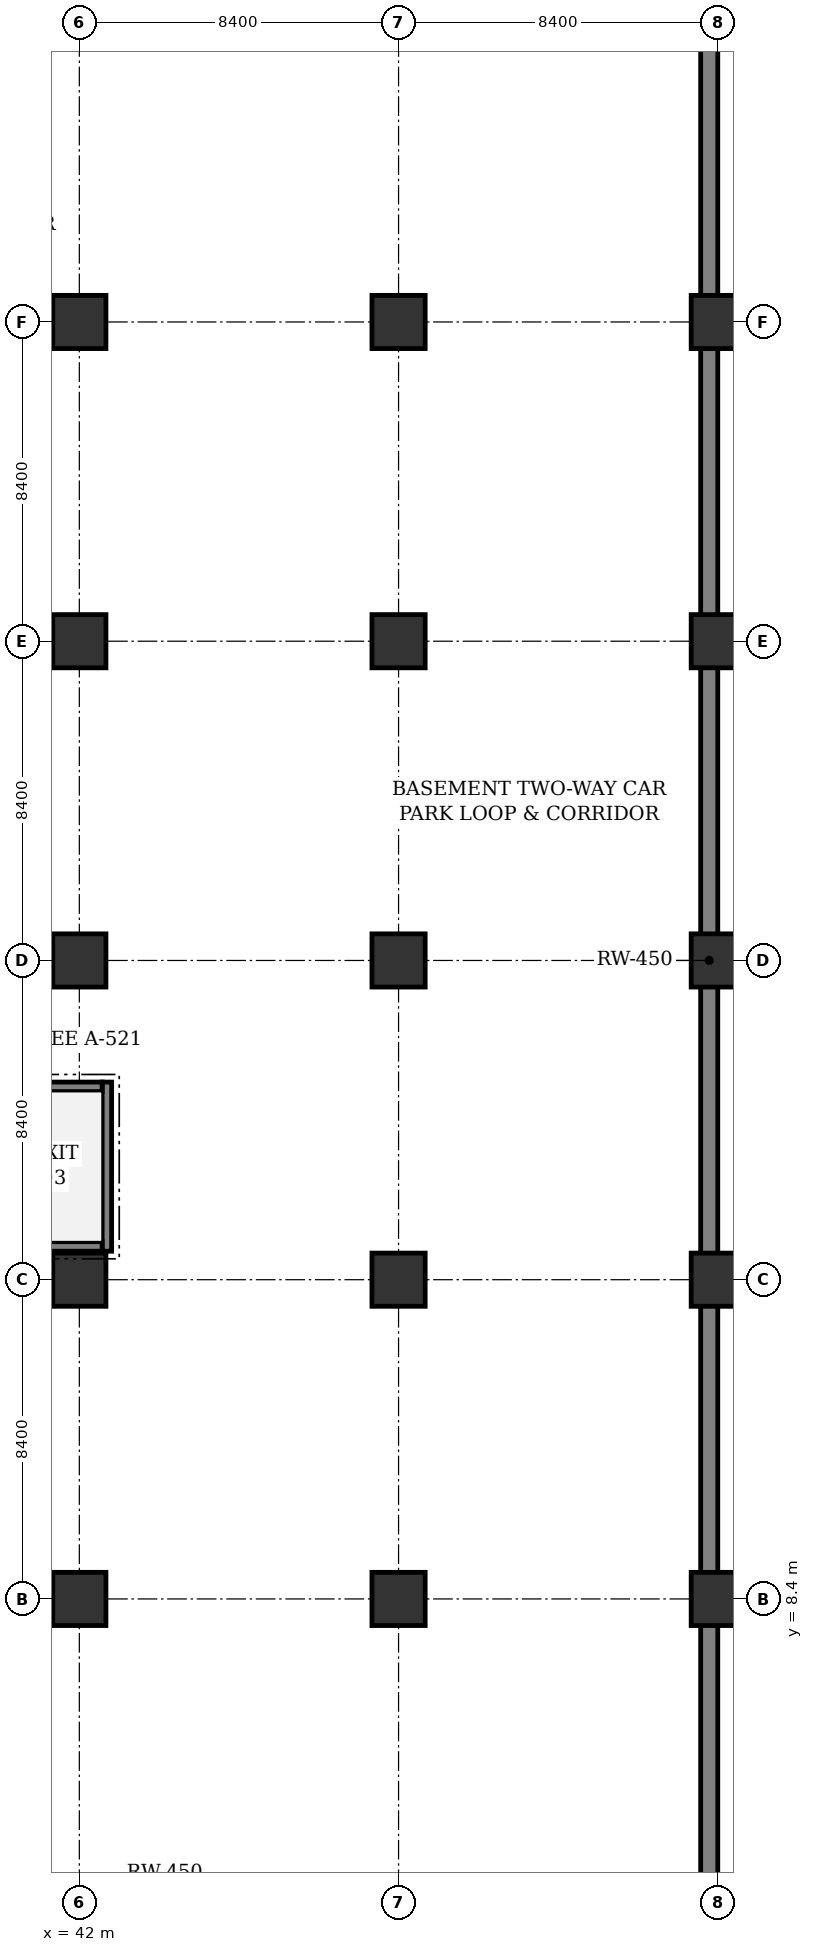
"""IFC4 building model, lengths in metres.
Left out: names, types, materials, properties, quantities, classifications, styles, units other than length and angle.
Written with IfcOpenShell. Run it as: python <this file> out.ifc"""

import sys

from ifc_helpers import new_model, si_unit, direction, frame, frame_2d, origin, origin_2d, place, context, subcontext, project, spatial, rectangle, extrude, element, save


model = new_model("IFC4")
c1 = context("Model", 3, precision=1e-05, world=origin(), true_north=direction((0.0, 1.0)))
c2 = subcontext(c1, "Body", "Model", "MODEL_VIEW")
j1 = project(units=[si_unit("LENGTHUNIT", "METRE"), si_unit("PLANEANGLEUNIT", "RADIAN")], contexts=[c1])
p1 = place(None, origin())
s1 = spatial("IfcSite", under=j1, at=p1, CompositionType="ELEMENT")
p2 = place(p1, origin())
s2 = spatial("IfcBuilding", under=s1, at=p2, CompositionType="ELEMENT")
p3 = place(p2, frame((0.0, 0.0, -4.8)))
s3 = spatial("IfcBuildingStorey", under=s2, at=p3, CompositionType="ELEMENT", Elevation=-4.8)
p4 = place(p3, frame((58.575, 0.45, 0.0), z_axis=(0.0, 0.0, 1.0), x_axis=(0.0, 1.0, 0.0)))
e1 = element("IfcWall", 1, at=p4, inside=s3, PredefinedType="SOLIDWALL", context=c2, shape_type="SweptSolid", body=[
    extrude(rectangle(XDim=49.5, YDim=0.45, at=frame_2d((24.75, 0.0))), origin(), (0.0, 0.0, 1.0), 4.48),
])
for number, where, z_axis, x_axis in (
    (2, (42.0, 8.4, 0.0), (0.0, 0.0, 1.0), (1.0, 0.0, 0.0)),
    (3, (42.0, 16.8, 0.0), (0.0, 0.0, 1.0), (1.0, 0.0, 0.0)),
    (4, (42.0, 25.2, 0.0), (0.0, 0.0, 1.0), (1.0, 0.0, 0.0)),
    (5, (42.0, 33.6, 0.0), (0.0, 0.0, 1.0), (1.0, 0.0, 0.0)),
    (6, (42.0, 42.0, 0.0), (0.0, 0.0, 1.0), (1.0, 0.0, 0.0)),
    (7, (50.4, 8.4, 0.0), (0.0, 0.0, 1.0), (1.0, 0.0, 0.0)),
    (8, (50.4, 16.8, 0.0), (0.0, 0.0, 1.0), (1.0, 0.0, 0.0)),
    (9, (50.4, 25.2, 0.0), (0.0, 0.0, 1.0), (1.0, 0.0, 0.0)),
    (10, (50.4, 33.6, 0.0), (0.0, 0.0, 1.0), (1.0, 0.0, 0.0)),
    (11, (50.4, 42.0, 0.0), (0.0, 0.0, 1.0), (1.0, 0.0, 0.0)),
    (12, (58.8, 8.4, 0.0), (0.0, 0.0, 1.0), (1.0, 0.0, 0.0)),
    (13, (58.8, 16.8, 0.0), (0.0, 0.0, 1.0), (1.0, 0.0, 0.0)),
    (14, (58.8, 25.2, 0.0), (0.0, 0.0, 1.0), (1.0, 0.0, 0.0)),
    (15, (58.8, 33.6, 0.0), (0.0, 0.0, 1.0), (1.0, 0.0, 0.0)),
    (16, (58.8, 42.0, 0.0), (0.0, 0.0, 1.0), (1.0, 0.0, 0.0)),
):
    element("IfcColumn", number, at=place(p3, frame(where, z_axis=z_axis, x_axis=x_axis)), inside=s3, PredefinedType="COLUMN", context=c2, shape_type="SweptSolid", body=[
        extrude(rectangle(XDim=1.4, YDim=1.4, at=origin_2d()), origin(), (0.0, 0.0, 1.0), 4.8),
    ])
p5 = place(p3, frame((42.725, 17.55, 0.0), z_axis=(0.0, 0.0, 1.0), x_axis=(0.0, 1.0, 0.0)))
e17 = element("IfcWall", 17, at=p5, inside=s3, PredefinedType="SHEAR", context=c2, shape_type="SweptSolid", body=[
    extrude(rectangle(XDim=4.45, YDim=0.25, at=frame_2d((2.225, 0.0))), origin(), (0.0, 0.0, 1.0), 4.48),
])
for number, where, z_axis, x_axis in (
    (18, (34.65, 17.675, 0.0), (0.0, 0.0, 1.0), (1.0, 0.0, 0.0)),
    (19, (34.65, 21.875, 0.0), (0.0, 0.0, 1.0), (1.0, 0.0, 0.0)),
):
    element("IfcWall", number, at=place(p3, frame(where, z_axis=z_axis, x_axis=x_axis)), inside=s3, PredefinedType="SHEAR", context=c2, shape_type="SweptSolid", body=[
        extrude(rectangle(XDim=7.95, YDim=0.25, at=frame_2d((3.975, 0.0))), origin(), (0.0, 0.0, 1.0), 4.48),
    ])
save(model, sys.argv[1])
